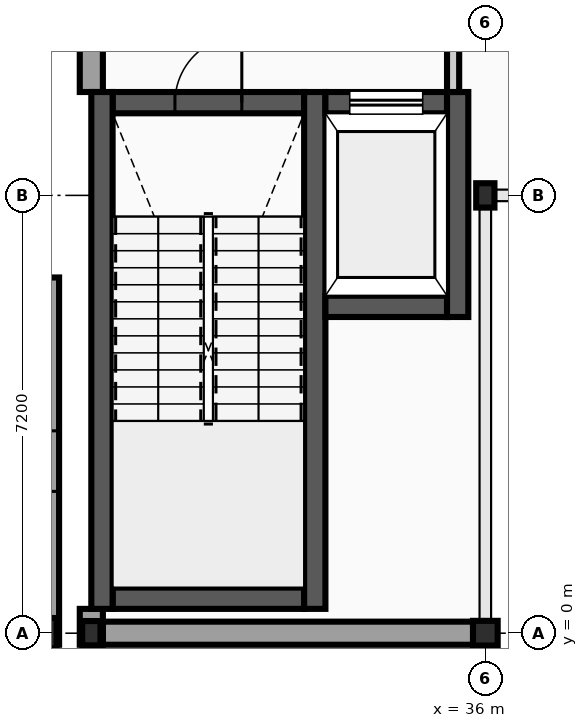
"""IFC4 building model, lengths in metres.
Left out: names, types, materials, properties, quantities, classifications, styles, units other than length and angle.
Written with IfcOpenShell. Run it as: python <this file> out.ifc"""

import sys

from ifc_helpers import new_model, si_unit, direction, frame, frame_2d, origin, origin_2d, place, context, subcontext, project, spatial, rectangle, hollow_circle, i_section, extrude, element, fill, save


model = new_model("IFC4")
c1 = context("Model", 3, precision=1e-05, world=origin(), true_north=direction((0.0, 1.0)))
c2 = subcontext(c1, "Body", "Model", "MODEL_VIEW")
j1 = project(units=[si_unit("LENGTHUNIT", "METRE"), si_unit("PLANEANGLEUNIT", "RADIAN")], contexts=[c1])
p1 = place(None, origin())
s1 = spatial("IfcSite", under=j1, at=p1, CompositionType="ELEMENT")
p2 = place(p1, origin())
s2 = spatial("IfcBuilding", under=s1, at=p2, CompositionType="ELEMENT")
p3 = place(p2, frame((0.0, 0.0, 5.2)))
s3 = spatial("IfcBuildingStorey", under=s2, at=p3, CompositionType="ELEMENT", Elevation=5.2)
p4 = place(p3, frame((28.8, 0.0, 0.0), z_axis=(0.0, 0.0, 1.0), x_axis=(1.0, 0.0, 0.0)))
e1 = element("IfcColumn", 1, at=p4, inside=s3, PredefinedType="COLUMN", context=c2, shape_type="SweptSolid", body=[
    extrude(i_section(OverallWidth=0.3, OverallDepth=0.5, WebThickness=0.014, FlangeThickness=0.028, FilletRadius=0.027, at=origin_2d()), origin(), (0.0, 0.0, 1.0), 4.4),
])
p5 = place(p3, frame((29.52, 0.0, 0.0), z_axis=(0.0, 0.0, 1.0), x_axis=(1.0, 0.0, 0.0)))
e2 = element("IfcColumn", 2, at=p5, inside=s3, PredefinedType="COLUMN", context=c2, shape_type="SweptSolid", body=[
    extrude(i_section(OverallWidth=0.3, OverallDepth=0.4, WebThickness=0.013, FlangeThickness=0.024, FilletRadius=0.027, at=origin_2d()), origin(), (0.0, 0.0, 1.0), 4.4),
])
p6 = place(p3, frame((36.0, 0.0, 0.0), z_axis=(0.0, 0.0, 1.0), x_axis=(1.0, 0.0, 0.0)))
e3 = element("IfcColumn", 3, at=p6, inside=s3, PredefinedType="COLUMN", context=c2, shape_type="SweptSolid", body=[
    extrude(hollow_circle(Radius=0.203, WallThickness=0.016, at=origin_2d()), origin(), (0.0, 0.0, 1.0), 4.4),
])
p7 = place(p3, frame((36.0, 7.2, 0.0), z_axis=(0.0, 0.0, 1.0), x_axis=(1.0, 0.0, 0.0)))
e4 = element("IfcColumn", 4, at=p7, inside=s3, PredefinedType="COLUMN", context=c2, shape_type="SweptSolid", body=[
    extrude(i_section(OverallWidth=0.3, OverallDepth=0.4, WebThickness=0.013, FlangeThickness=0.024, FilletRadius=0.027, at=origin_2d()), origin(), (0.0, 0.0, 1.0), 4.4),
])
p8 = place(p3, frame((28.8, -0.19, 0.0), z_axis=(0.0, 0.0, 1.0), x_axis=(0.0, 1.0, 0.0)))
e5 = element("IfcWall", 5, at=p8, inside=s3, PredefinedType="STANDARD", context=c2, shape_type="SweptSolid", body=[
    extrude(rectangle(XDim=6.04, YDim=0.38, at=frame_2d((3.02, 0.0))), origin(), (0.0, 0.0, 1.0), 4.185),
])
p9 = place(p8, frame((2.522, 0.0, 0.95)))
e6 = element("IfcOpeningElement", 6, at=p9, cuts=e5, PredefinedType="OPENING", context=c2, shape_type="SweptSolid", body=[
    extrude(rectangle(XDim=0.996, YDim=1.296, at=frame_2d((0.498, 0.648))), frame((0.0, 0.2, 0.0), z_axis=(0.0, -1.0, 0.0), x_axis=(1.0, 0.0, 0.0)), (0.0, 0.0, 1.0), 0.4),
])
p10 = place(p3, frame((29.71, 0.0, 0.0), z_axis=(0.0, 0.0, 1.0), x_axis=(1.0, 0.0, 0.0)))
e7 = element("IfcWall", 7, at=p10, inside=s3, PredefinedType="STANDARD", context=c2, shape_type="SweptSolid", body=[
    extrude(rectangle(XDim=6.4, YDim=0.38, at=frame_2d((3.2, 0.0))), origin(), (0.0, 0.0, 1.0), 3.88),
])
p11 = place(p3, frame((29.52, 0.4, 0.0), z_axis=(0.0, 0.0, 1.0), x_axis=(0.0, -1.0, 0.0)))
e8 = element("IfcWall", 8, at=p11, inside=s3, PredefinedType="STANDARD", context=c2, shape_type="SweptSolid", body=[
    extrude(rectangle(XDim=0.59, YDim=0.38, at=frame_2d((0.295, 0.0))), origin(), (0.0, 0.0, 1.0), 4.185),
])
p12 = place(p3, frame((29.52, 14.4, 0.0), z_axis=(0.0, 0.0, 1.0), x_axis=(0.0, -1.0, 0.0)))
e9 = element("IfcWall", 9, at=p12, inside=s3, PredefinedType="STANDARD", context=c2, shape_type="SweptSolid", body=[
    extrude(rectangle(XDim=5.5, YDim=0.38, at=frame_2d((2.75, 0.0))), origin(), (0.0, 0.0, 1.0), 4.185),
])
p13 = place(p3, frame((29.87, 0.575, 0.0), z_axis=(0.0, 0.0, 1.0), x_axis=(1.0, 0.0, 0.0)))
e10 = element("IfcWall", 10, at=p13, inside=s3, PredefinedType="SHEAR", context=c2, shape_type="SweptSolid", body=[
    extrude(rectangle(XDim=3.15, YDim=0.35, at=frame_2d((1.575, 0.0))), origin(), (0.0, 0.0, 1.0), 4.185),
])
p14 = place(p3, frame((29.87, 8.725, 0.0), z_axis=(0.0, 0.0, 1.0), x_axis=(1.0, 0.0, 0.0)))
e11 = element("IfcWall", 11, at=p14, inside=s3, PredefinedType="SHEAR", context=c2, shape_type="SweptSolid", body=[
    extrude(rectangle(XDim=3.15, YDim=0.35, at=frame_2d((1.575, 0.0))), origin(), (0.0, 0.0, 1.0), 4.185),
])
p15 = place(p14, frame((1.025, 0.0, 0.0)))
e12 = element("IfcOpeningElement", 12, at=p15, cuts=e11, PredefinedType="OPENING", context=c2, shape_type="SweptSolid", body=[
    extrude(rectangle(XDim=1.1, YDim=2.15, at=frame_2d((0.55, 1.075))), frame((0.0, 0.185, 0.0), z_axis=(0.0, -1.0, 0.0), x_axis=(1.0, 0.0, 0.0)), (0.0, 0.0, 1.0), 0.37),
])
for number, where, z_axis, x_axis in (
    (13, (29.695, 0.4, 0.0), (0.0, 0.0, 1.0), (0.0, 1.0, 0.0)),
    (14, (33.195, 0.4, 0.0), (0.0, 0.0, 1.0), (0.0, 1.0, 0.0)),
):
    element("IfcWall", number, at=place(p3, frame(where, z_axis=z_axis, x_axis=x_axis)), inside=s3, PredefinedType="SHEAR", context=c2, shape_type="SweptSolid", body=[
        extrude(rectangle(XDim=8.5, YDim=0.35, at=frame_2d((4.25, 0.0))), origin(), (0.0, 0.0, 1.0), 4.185),
    ])
p16 = place(p3, frame((33.37, 5.375, 0.0), z_axis=(0.0, 0.0, 1.0), x_axis=(1.0, 0.0, 0.0)))
e15 = element("IfcWall", 15, at=p16, inside=s3, PredefinedType="SHEAR", context=c2, shape_type="SweptSolid", body=[
    extrude(rectangle(XDim=2.0, YDim=0.35, at=frame_2d((1.0, 0.0))), origin(), (0.0, 0.0, 1.0), 4.185),
])
p17 = place(p3, frame((33.37, 8.725, 0.0), z_axis=(0.0, 0.0, 1.0), x_axis=(1.0, 0.0, 0.0)))
e16 = element("IfcWall", 16, at=p17, inside=s3, PredefinedType="SHEAR", context=c2, shape_type="SweptSolid", body=[
    extrude(rectangle(XDim=2.0, YDim=0.35, at=frame_2d((1.0, 0.0))), origin(), (0.0, 0.0, 1.0), 4.185),
])
p18 = place(p17, frame((0.4, 0.0, 0.0)))
e17 = element("IfcOpeningElement", 17, at=p18, cuts=e16, PredefinedType="OPENING", context=c2, shape_type="SweptSolid", body=[
    extrude(rectangle(XDim=1.2, YDim=2.2, at=frame_2d((0.6, 1.1))), frame((0.0, 0.185, 0.0), z_axis=(0.0, -1.0, 0.0), x_axis=(1.0, 0.0, 0.0)), (0.0, 0.0, 1.0), 0.37),
])
p19 = place(p3, frame((35.545, 5.2, 0.0), z_axis=(0.0, 0.0, 1.0), x_axis=(0.0, 1.0, 0.0)))
e18 = element("IfcWall", 18, at=p19, inside=s3, PredefinedType="SHEAR", context=c2, shape_type="SweptSolid", body=[
    extrude(rectangle(XDim=3.7, YDim=0.35, at=frame_2d((1.85, 0.0))), origin(), (0.0, 0.0, 1.0), 4.185),
])
p20 = place(p3, frame((35.47, 8.9, 0.0), z_axis=(0.0, 0.0, 1.0), x_axis=(0.0, 1.0, 0.0)))
e19 = element("IfcWall", 19, at=p20, inside=s3, PredefinedType="PARTITIONING", context=c2, shape_type="SweptSolid", body=[
    extrude(rectangle(XDim=2.45, YDim=0.2, at=frame_2d((1.225, 0.0))), origin(), (0.0, 0.0, 1.0), 4.185),
])
p21 = place(p15, frame((1.1, 0.0, 0.0), z_axis=(0.0, 0.0, 1.0), x_axis=(-1.0, 0.0, 0.0)))
e20 = element("IfcDoor", 20, at=p21, inside=s3, OperationType="SINGLE_SWING_RIGHT", PredefinedType="DOOR", context=c2, shape_type="SweptSolid", body=[
    extrude(rectangle(XDim=1.1, YDim=2.15, at=frame_2d((0.55, 1.075))), frame((0.0, 0.025, 0.0), z_axis=(0.0, -1.0, 0.0), x_axis=(1.0, 0.0, 0.0)), (0.0, 0.0, 1.0), 0.05),
])
fill(e12, e20)
p22 = place(p18, origin())
e21 = element("IfcDoor", 21, at=p22, inside=s3, OperationType="SLIDING_TO_RIGHT", PredefinedType="DOOR", context=c2, shape_type="SweptSolid", body=[
    extrude(rectangle(XDim=1.2, YDim=2.2, at=frame_2d((0.6, 1.1))), frame((0.0, 0.025, 0.0), z_axis=(0.0, -1.0, 0.0), x_axis=(1.0, 0.0, 0.0)), (0.0, 0.0, 1.0), 0.05),
])
fill(e17, e21)
save(model, sys.argv[1])
